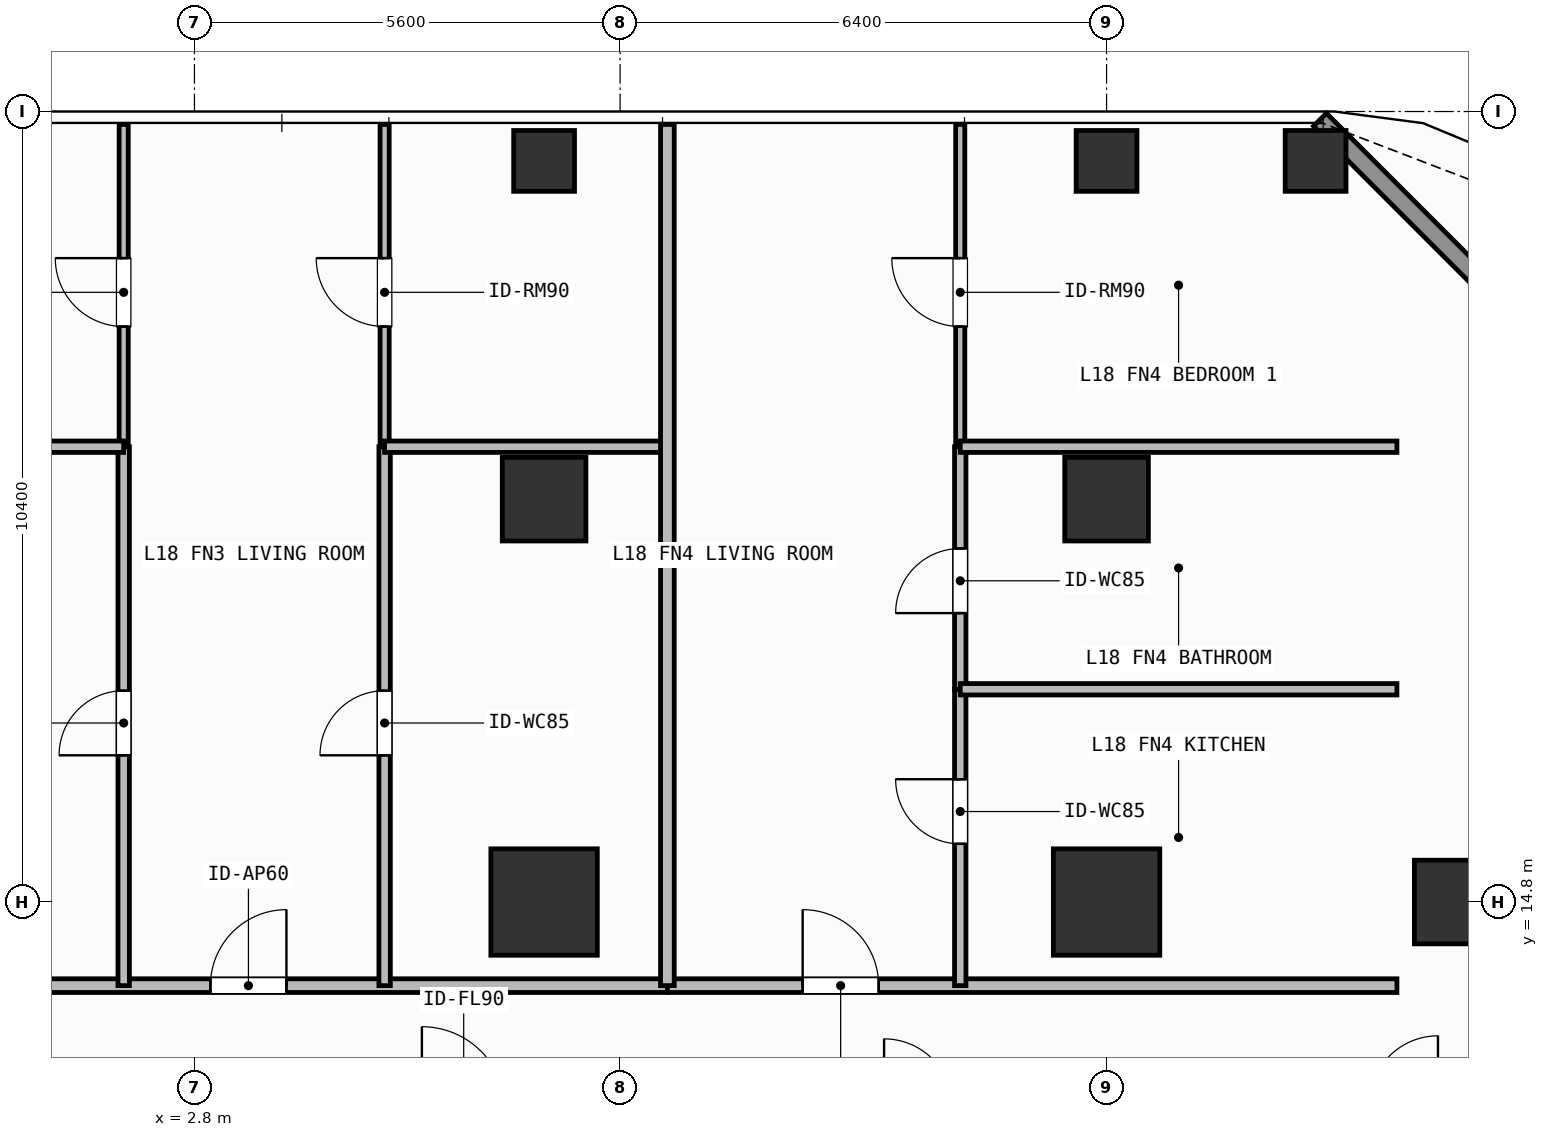
"""IFC4 building model, lengths in metres.
Left out: names, types, materials, properties, quantities, classifications, styles, units other than length and angle.
Written with IfcOpenShell. Run it as: python <this file> out.ifc"""

import sys

from ifc_helpers import new_model, si_unit, direction, frame, frame_2d, origin, origin_2d, place, context, subcontext, project, spatial, rectangle, hollow_rectangle, extrude, element, fill, save


model = new_model("IFC4")
c1 = context("Model", 3, precision=1e-05, world=origin(), true_north=direction((0.0, 1.0)))
c2 = subcontext(c1, "Body", "Model", "MODEL_VIEW")
j1 = project(units=[si_unit("LENGTHUNIT", "METRE"), si_unit("PLANEANGLEUNIT", "RADIAN")], contexts=[c1])
p1 = place(None, origin())
s1 = spatial("IfcSite", under=j1, at=p1, CompositionType="ELEMENT")
p2 = place(p1, origin())
s2 = spatial("IfcBuilding", under=s1, at=p2, CompositionType="ELEMENT")
p3 = place(p2, frame((0.0, 0.0, 69.6)))
s3 = spatial("IfcBuildingStorey", under=s2, at=p3, CompositionType="ELEMENT", Elevation=69.6)
for number, where, z_axis, x_axis in (
    (1, (7.4, 14.8, 0.0), (0.0, 0.0, 1.0), (1.0, 0.0, 0.0)),
    (2, (14.8, 14.8, 0.0), (0.0, 0.0, 1.0), (1.0, 0.0, 0.0)),
):
    element("IfcColumn", number, at=place(p3, frame(where, z_axis=z_axis, x_axis=x_axis)), inside=s3, PredefinedType="COLUMN", context=c2, shape_type="SweptSolid", body=[
        extrude(rectangle(XDim=1.4, YDim=1.4, at=origin_2d()), origin(), (0.0, 0.0, 1.0), 3.9),
    ])
for number, where, z_axis, x_axis in (
    (3, (19.4, 14.8, 0.0), (0.0, 0.0, 1.0), (1.0, 0.0, 0.0)),
    (4, (7.4, 20.1, 0.0), (0.0, 0.0, 1.0), (1.0, 0.0, 0.0)),
    (5, (14.8, 20.1, 0.0), (0.0, 0.0, 1.0), (1.0, 0.0, 0.0)),
):
    element("IfcColumn", number, at=place(p3, frame(where, z_axis=z_axis, x_axis=x_axis)), inside=s3, PredefinedType="COLUMN", context=c2, shape_type="SweptSolid", body=[
        extrude(rectangle(XDim=1.1, YDim=1.1, at=origin_2d()), origin(), (0.0, 0.0, 1.0), 3.9),
    ])
for number, where, z_axis, x_axis in (
    (6, (17.55, 24.55, 0.0), (0.0, 0.0, 1.0), (1.0, 0.0, 0.0)),
    (7, (7.4, 24.55, 0.0), (0.0, 0.0, 1.0), (1.0, 0.0, 0.0)),
    (8, (14.8, 24.55, 0.0), (0.0, 0.0, 1.0), (1.0, 0.0, 0.0)),
):
    element("IfcColumn", number, at=place(p3, frame(where, z_axis=z_axis, x_axis=x_axis)), inside=s3, PredefinedType="COLUMN", context=c2, shape_type="SweptSolid", body=[
        extrude(hollow_rectangle(XDim=0.8, YDim=0.8, WallThickness=0.036, at=origin_2d()), origin(), (0.0, 0.0, 1.0), 3.9),
    ])
p4 = place(p3, frame((17.608, 25.092, 0.0), z_axis=(0.0, 0.0, 1.0), x_axis=(0.707106781187, -0.707106781187, 0.0)))
e9 = element("IfcWall", 9, at=p4, inside=s3, PredefinedType="SOLIDWALL", context=c2, shape_type="SweptSolid", body=[
    extrude(rectangle(XDim=6.484, YDim=0.24, at=frame_2d((3.242, 0.0))), origin(), (0.0, 0.0, 1.0), 3.68),
])
p5 = place(p3, frame((-2.9, 13.7, 0.0), z_axis=(0.0, 0.0, 1.0), x_axis=(1.0, 0.0, 0.0)))
e10 = element("IfcWall", 10, at=p5, inside=s3, PredefinedType="PARTITIONING", context=c2, shape_type="SweptSolid", body=[
    extrude(rectangle(XDim=11.922, YDim=0.18, at=frame_2d((5.961, 0.0))), origin(), (0.0, 0.0, 1.0), 3.68),
])
p6 = place(p5, frame((5.91, 0.0, 0.0)))
e11 = element("IfcOpeningElement", 11, at=p6, cuts=e10, PredefinedType="OPENING", context=c2, shape_type="SweptSolid", body=[
    extrude(rectangle(XDim=1.0, YDim=2.2, at=frame_2d((0.5, 1.1))), frame((0.0, 0.1, 0.0), z_axis=(0.0, -1.0, 0.0), x_axis=(1.0, 0.0, 0.0)), (0.0, 0.0, 1.0), 0.2),
])
p7 = place(p3, frame((1.869, 13.7, 0.0), z_axis=(0.0, 0.0, 1.0), x_axis=(0.0, 1.0, 0.0)))
e12 = element("IfcWall", 12, at=p7, inside=s3, PredefinedType="PARTITIONING", context=c2, shape_type="SweptSolid", body=[
    extrude(rectangle(XDim=7.09, YDim=0.15, at=frame_2d((3.545, 0.0))), origin(), (0.0, 0.0, 1.0), 3.68),
])
p8 = place(p7, frame((3.03, 0.0, 0.0)))
e13 = element("IfcOpeningElement", 13, at=p8, cuts=e12, PredefinedType="OPENING", context=c2, shape_type="SweptSolid", body=[
    extrude(rectangle(XDim=0.85, YDim=2.1, at=frame_2d((0.425, 1.05))), frame((0.0, 0.085, 0.0), z_axis=(0.0, -1.0, 0.0), x_axis=(1.0, 0.0, 0.0)), (0.0, 0.0, 1.0), 0.17),
])
p9 = place(p3, frame((1.869, 20.79, 0.0), z_axis=(0.0, 0.0, 1.0), x_axis=(0.0, 1.0, 0.0)))
e14 = element("IfcWall", 14, at=p9, inside=s3, PredefinedType="PARTITIONING", context=c2, shape_type="SweptSolid", body=[
    extrude(rectangle(XDim=4.24, YDim=0.12, at=frame_2d((2.12, 0.0))), origin(), (0.0, 0.0, 1.0), 3.68),
])
p10 = place(p9, frame((1.581, 0.0, 0.0)))
e15 = element("IfcOpeningElement", 15, at=p10, cuts=e14, PredefinedType="OPENING", context=c2, shape_type="SweptSolid", body=[
    extrude(rectangle(XDim=0.9, YDim=2.1, at=frame_2d((0.45, 1.05))), frame((0.0, 0.07, 0.0), z_axis=(0.0, -1.0, 0.0), x_axis=(1.0, 0.0, 0.0)), (0.0, 0.0, 1.0), 0.14),
])
p11 = place(p3, frame((5.302, 13.7, 0.0), z_axis=(0.0, 0.0, 1.0), x_axis=(0.0, 1.0, 0.0)))
e16 = element("IfcWall", 16, at=p11, inside=s3, PredefinedType="PARTITIONING", context=c2, shape_type="SweptSolid", body=[
    extrude(rectangle(XDim=7.09, YDim=0.15, at=frame_2d((3.545, 0.0))), origin(), (0.0, 0.0, 1.0), 3.68),
])
p12 = place(p11, frame((3.03, 0.0, 0.0)))
e17 = element("IfcOpeningElement", 17, at=p12, cuts=e16, PredefinedType="OPENING", context=c2, shape_type="SweptSolid", body=[
    extrude(rectangle(XDim=0.85, YDim=2.1, at=frame_2d((0.425, 1.05))), frame((0.0, 0.085, 0.0), z_axis=(0.0, -1.0, 0.0), x_axis=(1.0, 0.0, 0.0)), (0.0, 0.0, 1.0), 0.17),
])
p13 = place(p3, frame((5.302, 20.79, 0.0), z_axis=(0.0, 0.0, 1.0), x_axis=(0.0, 1.0, 0.0)))
e18 = element("IfcWall", 18, at=p13, inside=s3, PredefinedType="PARTITIONING", context=c2, shape_type="SweptSolid", body=[
    extrude(rectangle(XDim=4.24, YDim=0.12, at=frame_2d((2.12, 0.0))), origin(), (0.0, 0.0, 1.0), 3.68),
])
p14 = place(p13, frame((1.581, 0.0, 0.0)))
e19 = element("IfcOpeningElement", 19, at=p14, cuts=e18, PredefinedType="OPENING", context=c2, shape_type="SweptSolid", body=[
    extrude(rectangle(XDim=0.9, YDim=2.1, at=frame_2d((0.45, 1.05))), frame((0.0, 0.07, 0.0), z_axis=(0.0, -1.0, 0.0), x_axis=(1.0, 0.0, 0.0)), (0.0, 0.0, 1.0), 0.14),
])
p15 = place(p3, frame((9.022, 13.7, 0.0), z_axis=(0.0, 0.0, 1.0), x_axis=(1.0, 0.0, 0.0)))
e20 = element("IfcWall", 20, at=p15, inside=s3, PredefinedType="PARTITIONING", context=c2, shape_type="SweptSolid", body=[
    extrude(rectangle(XDim=9.598, YDim=0.18, at=frame_2d((4.799, 0.0))), origin(), (0.0, 0.0, 1.0), 3.68),
])
p16 = place(p15, frame((1.78, 0.0, 0.0)))
e21 = element("IfcOpeningElement", 21, at=p16, cuts=e20, PredefinedType="OPENING", context=c2, shape_type="SweptSolid", body=[
    extrude(rectangle(XDim=1.0, YDim=2.2, at=frame_2d((0.5, 1.1))), frame((0.0, 0.1, 0.0), z_axis=(0.0, -1.0, 0.0), x_axis=(1.0, 0.0, 0.0)), (0.0, 0.0, 1.0), 0.2),
])
p17 = place(p3, frame((12.875, 13.7, 0.0), z_axis=(0.0, 0.0, 1.0), x_axis=(0.0, 1.0, 0.0)))
e22 = element("IfcWall", 22, at=p17, inside=s3, PredefinedType="PARTITIONING", context=c2, shape_type="SweptSolid", body=[
    extrude(rectangle(XDim=3.899, YDim=0.15, at=frame_2d((1.95, 0.0))), origin(), (0.0, 0.0, 1.0), 3.68),
])
p18 = place(p17, frame((1.865, 0.0, 0.0)))
e23 = element("IfcOpeningElement", 23, at=p18, cuts=e22, PredefinedType="OPENING", context=c2, shape_type="SweptSolid", body=[
    extrude(rectangle(XDim=0.85, YDim=2.1, at=frame_2d((0.425, 1.05))), frame((0.0, 0.085, 0.0), z_axis=(0.0, -1.0, 0.0), x_axis=(1.0, 0.0, 0.0)), (0.0, 0.0, 1.0), 0.17),
])
p19 = place(p3, frame((12.875, 17.599, 0.0), z_axis=(0.0, 0.0, 1.0), x_axis=(0.0, 1.0, 0.0)))
e24 = element("IfcWall", 24, at=p19, inside=s3, PredefinedType="PARTITIONING", context=c2, shape_type="SweptSolid", body=[
    extrude(rectangle(XDim=3.191, YDim=0.15, at=frame_2d((1.595, 0.0))), origin(), (0.0, 0.0, 1.0), 3.68),
])
p20 = place(p19, frame((1.002, 0.0, 0.0)))
e25 = element("IfcOpeningElement", 25, at=p20, cuts=e24, PredefinedType="OPENING", context=c2, shape_type="SweptSolid", body=[
    extrude(rectangle(XDim=0.85, YDim=2.1, at=frame_2d((0.425, 1.05))), frame((0.0, 0.085, 0.0), z_axis=(0.0, -1.0, 0.0), x_axis=(1.0, 0.0, 0.0)), (0.0, 0.0, 1.0), 0.17),
])
p21 = place(p3, frame((12.875, 20.79, 0.0), z_axis=(0.0, 0.0, 1.0), x_axis=(0.0, 1.0, 0.0)))
e26 = element("IfcWall", 26, at=p21, inside=s3, PredefinedType="PARTITIONING", context=c2, shape_type="SweptSolid", body=[
    extrude(rectangle(XDim=4.24, YDim=0.12, at=frame_2d((2.12, 0.0))), origin(), (0.0, 0.0, 1.0), 3.68),
])
p22 = place(p21, frame((1.581, 0.0, 0.0)))
e27 = element("IfcOpeningElement", 27, at=p22, cuts=e26, PredefinedType="OPENING", context=c2, shape_type="SweptSolid", body=[
    extrude(rectangle(XDim=0.9, YDim=2.1, at=frame_2d((0.45, 1.05))), frame((0.0, 0.07, 0.0), z_axis=(0.0, -1.0, 0.0), x_axis=(1.0, 0.0, 0.0)), (0.0, 0.0, 1.0), 0.14),
])
p23 = place(p3, frame((-2.9, 20.79, 0.0), z_axis=(0.0, 0.0, 1.0), x_axis=(1.0, 0.0, 0.0)))
e28 = element("IfcWall", 28, at=p23, inside=s3, PredefinedType="PARTITIONING", context=c2, shape_type="SweptSolid", body=[
    extrude(rectangle(XDim=4.769, YDim=0.15, at=frame_2d((2.384, 0.0))), origin(), (0.0, 0.0, 1.0), 3.68),
])
p24 = place(p3, frame((5.302, 20.79, 0.0), z_axis=(0.0, 0.0, 1.0), x_axis=(1.0, 0.0, 0.0)))
e29 = element("IfcWall", 29, at=p24, inside=s3, PredefinedType="PARTITIONING", context=c2, shape_type="SweptSolid", body=[
    extrude(rectangle(XDim=3.72, YDim=0.15, at=frame_2d((1.86, 0.0))), origin(), (0.0, 0.0, 1.0), 3.68),
])
for number, where, z_axis, x_axis in (
    (30, (12.875, 17.599, 0.0), (0.0, 0.0, 1.0), (1.0, 0.0, 0.0)),
    (31, (12.875, 20.79, 0.0), (0.0, 0.0, 1.0), (1.0, 0.0, 0.0)),
):
    element("IfcWall", number, at=place(p3, frame(where, z_axis=z_axis, x_axis=x_axis)), inside=s3, PredefinedType="PARTITIONING", context=c2, shape_type="SweptSolid", body=[
        extrude(rectangle(XDim=5.745, YDim=0.15, at=frame_2d((2.873, 0.0))), origin(), (0.0, 0.0, 1.0), 3.68),
    ])
p25 = place(p3, frame((9.022, 13.7, 0.0), z_axis=(0.0, 0.0, 1.0), x_axis=(0.0, 1.0, 0.0)))
e32 = element("IfcWall", 32, at=p25, inside=s3, PredefinedType="PARTITIONING", context=c2, shape_type="SweptSolid", body=[
    extrude(rectangle(XDim=11.33, YDim=0.18, at=frame_2d((5.665, 0.0))), origin(), (0.0, 0.0, 1.0), 3.68),
])
p26 = place(p6, origin())
e33 = element("IfcDoor", 33, at=p26, inside=s3, OperationType="SINGLE_SWING_RIGHT", PredefinedType="DOOR", context=c2, shape_type="SweptSolid", body=[
    extrude(rectangle(XDim=1.0, YDim=2.2, at=frame_2d((0.5, 1.1))), frame((0.0, 0.025, 0.0), z_axis=(0.0, -1.0, 0.0), x_axis=(1.0, 0.0, 0.0)), (0.0, 0.0, 1.0), 0.05),
])
fill(e11, e33)
p27 = place(p8, origin())
e34 = element("IfcDoor", 34, at=p27, inside=s3, OperationType="SINGLE_SWING_LEFT", PredefinedType="DOOR", context=c2, shape_type="SweptSolid", body=[
    extrude(rectangle(XDim=0.85, YDim=2.1, at=frame_2d((0.425, 1.05))), frame((0.0, 0.025, 0.0), z_axis=(0.0, -1.0, 0.0), x_axis=(1.0, 0.0, 0.0)), (0.0, 0.0, 1.0), 0.05),
])
fill(e13, e34)
p28 = place(p10, origin())
e35 = element("IfcDoor", 35, at=p28, inside=s3, OperationType="SINGLE_SWING_RIGHT", PredefinedType="DOOR", context=c2, shape_type="SweptSolid", body=[
    extrude(rectangle(XDim=0.9, YDim=2.1, at=frame_2d((0.45, 1.05))), frame((0.0, 0.025, 0.0), z_axis=(0.0, -1.0, 0.0), x_axis=(1.0, 0.0, 0.0)), (0.0, 0.0, 1.0), 0.05),
])
fill(e15, e35)
p29 = place(p12, origin())
e36 = element("IfcDoor", 36, at=p29, inside=s3, OperationType="SINGLE_SWING_LEFT", PredefinedType="DOOR", context=c2, shape_type="SweptSolid", body=[
    extrude(rectangle(XDim=0.85, YDim=2.1, at=frame_2d((0.425, 1.05))), frame((0.0, 0.025, 0.0), z_axis=(0.0, -1.0, 0.0), x_axis=(1.0, 0.0, 0.0)), (0.0, 0.0, 1.0), 0.05),
])
fill(e17, e36)
p30 = place(p14, origin())
e37 = element("IfcDoor", 37, at=p30, inside=s3, OperationType="SINGLE_SWING_RIGHT", PredefinedType="DOOR", context=c2, shape_type="SweptSolid", body=[
    extrude(rectangle(XDim=0.9, YDim=2.1, at=frame_2d((0.45, 1.05))), frame((0.0, 0.025, 0.0), z_axis=(0.0, -1.0, 0.0), x_axis=(1.0, 0.0, 0.0)), (0.0, 0.0, 1.0), 0.05),
])
fill(e19, e37)
p31 = place(p16, origin())
e38 = element("IfcDoor", 38, at=p31, inside=s3, OperationType="SINGLE_SWING_LEFT", PredefinedType="DOOR", context=c2, shape_type="SweptSolid", body=[
    extrude(rectangle(XDim=1.0, YDim=2.2, at=frame_2d((0.5, 1.1))), frame((0.0, 0.025, 0.0), z_axis=(0.0, -1.0, 0.0), x_axis=(1.0, 0.0, 0.0)), (0.0, 0.0, 1.0), 0.05),
])
fill(e21, e38)
p32 = place(p18, origin())
e39 = element("IfcDoor", 39, at=p32, inside=s3, OperationType="SINGLE_SWING_RIGHT", PredefinedType="DOOR", context=c2, shape_type="SweptSolid", body=[
    extrude(rectangle(XDim=0.85, YDim=2.1, at=frame_2d((0.425, 1.05))), frame((0.0, 0.025, 0.0), z_axis=(0.0, -1.0, 0.0), x_axis=(1.0, 0.0, 0.0)), (0.0, 0.0, 1.0), 0.05),
])
fill(e23, e39)
p33 = place(p20, origin())
e40 = element("IfcDoor", 40, at=p33, inside=s3, OperationType="SINGLE_SWING_LEFT", PredefinedType="DOOR", context=c2, shape_type="SweptSolid", body=[
    extrude(rectangle(XDim=0.85, YDim=2.1, at=frame_2d((0.425, 1.05))), frame((0.0, 0.025, 0.0), z_axis=(0.0, -1.0, 0.0), x_axis=(1.0, 0.0, 0.0)), (0.0, 0.0, 1.0), 0.05),
])
fill(e25, e40)
p34 = place(p22, origin())
e41 = element("IfcDoor", 41, at=p34, inside=s3, OperationType="SINGLE_SWING_RIGHT", PredefinedType="DOOR", context=c2, shape_type="SweptSolid", body=[
    extrude(rectangle(XDim=0.9, YDim=2.1, at=frame_2d((0.45, 1.05))), frame((0.0, 0.025, 0.0), z_axis=(0.0, -1.0, 0.0), x_axis=(1.0, 0.0, 0.0)), (0.0, 0.0, 1.0), 0.05),
])
fill(e27, e41)
save(model, sys.argv[1])
